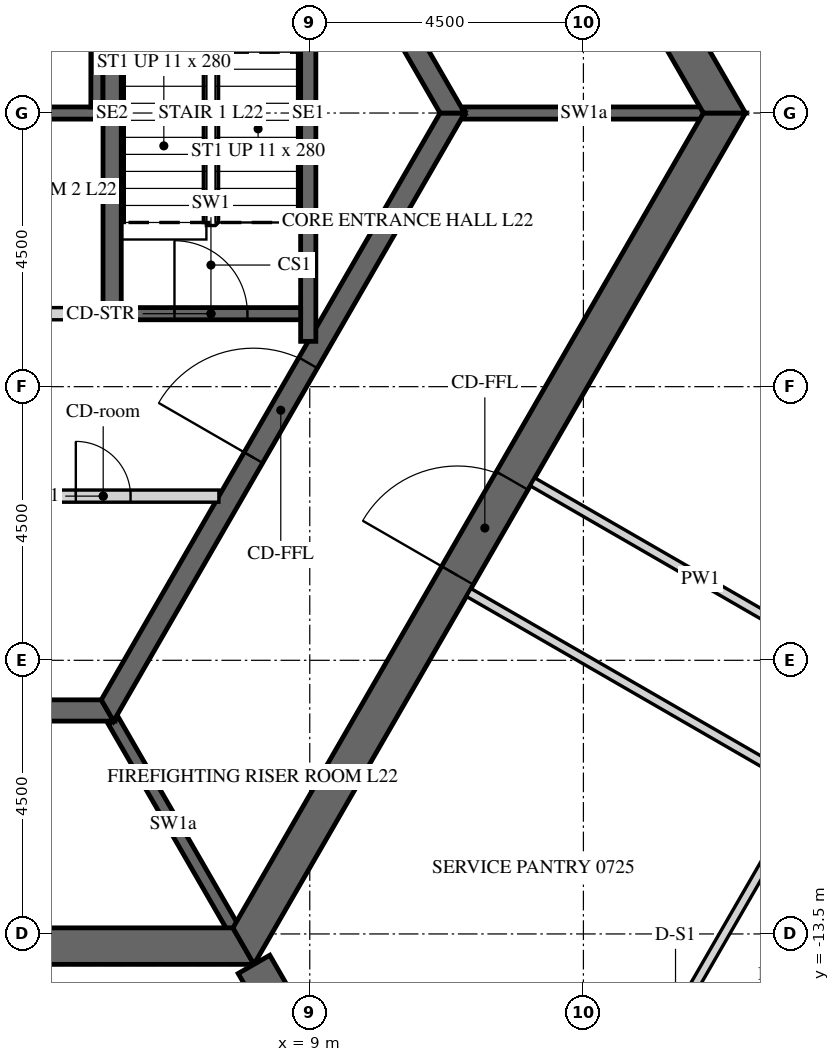
"""IFC4 building model, lengths in metres.
Left out: names, types, materials, properties, quantities, classifications, styles, units other than length and angle.
Written with IfcOpenShell. Run it as: python <this file> out.ifc"""

import sys

from ifc_helpers import new_model, si_unit, direction, frame, frame_2d, origin, place, context, subcontext, project, spatial, polyline, rectangle, outline, extrude, element, fill, save


model = new_model("IFC4")
c1 = context("Model", 3, precision=1e-05, world=origin(), true_north=direction((0.0, 1.0)))
c2 = subcontext(c1, "Body", "Model", "MODEL_VIEW")
j1 = project(units=[si_unit("LENGTHUNIT", "METRE"), si_unit("PLANEANGLEUNIT", "RADIAN")], contexts=[c1])
p1 = place(None, origin())
s1 = spatial("IfcSite", under=j1, at=p1, CompositionType="ELEMENT")
p2 = place(p1, origin())
s2 = spatial("IfcBuilding", under=s1, at=p2, CompositionType="ELEMENT")
p3 = place(p2, frame((0.0, 0.0, 99.9)))
s3 = spatial("IfcBuildingStorey", under=s2, at=p3, CompositionType="ELEMENT", Elevation=99.9)
p4 = place(p3, frame((-7.91, -13.7, -0.15), z_axis=(0.0, 0.0, 1.0), x_axis=(1.0, 0.0, 0.0)))
e1 = element("IfcWall", 1, at=p4, inside=s3, PredefinedType="SHEAR", context=c2, shape_type="SweptSolid", body=[
    extrude(outline(polyline([(-0.173, -0.3), (15.993, -0.3), (15.646, 0.3), (0.173, 0.3), (-0.173, -0.3)])), origin(), (0.0, 0.0, 1.0), 3.9),
])
p5 = place(p4, frame((7.31, 0.0, 0.15)))
e2 = element("IfcOpeningElement", 2, at=p5, cuts=e1, PredefinedType="OPENING", context=c2, shape_type="SweptSolid", body=[
    extrude(rectangle(XDim=1.2, YDim=2.4, at=frame_2d((0.6, 1.2))), frame((0.0, 0.31, 0.0), z_axis=(0.0, -1.0, 0.0), x_axis=(1.0, 0.0, 0.0)), (0.0, 0.0, 1.0), 0.62),
])
p6 = place(p3, frame((7.91, -13.7, -0.15), z_axis=(0.0, 0.0, 1.0), x_axis=(0.499999880136, 0.866025472988, 0.0)))
e3 = element("IfcWall", 3, at=p6, inside=s3, PredefinedType="SHEAR", context=c2, shape_type="SweptSolid", body=[
    extrude(outline(polyline([(-0.173, -0.3), (15.993, -0.3), (15.646, 0.3), (0.173, 0.3), (-0.173, -0.3)])), origin(), (0.0, 0.0, 1.0), 3.9),
])
p7 = place(p6, frame((7.039, 0.0, 0.15)))
e4 = element("IfcOpeningElement", 4, at=p7, cuts=e3, PredefinedType="OPENING", context=c2, shape_type="SweptSolid", body=[
    extrude(rectangle(XDim=1.8, YDim=2.4, at=frame_2d((0.9, 1.2))), frame((0.0, 0.31, 0.0), z_axis=(0.0, -1.0, 0.0), x_axis=(1.0, 0.0, 0.0)), (0.0, 0.0, 1.0), 0.62),
])
p8 = place(p3, frame((15.819, 0.0, -0.15), z_axis=(0.0, 0.0, 1.0), x_axis=(-0.499999880136, 0.866025472988, 0.0)))
e5 = element("IfcWall", 5, at=p8, inside=s3, PredefinedType="SHEAR", context=c2, shape_type="SweptSolid", body=[
    extrude(outline(polyline([(-0.173, -0.3), (15.993, -0.3), (15.646, 0.3), (0.173, 0.3), (-0.173, -0.3)])), origin(), (0.0, 0.0, 1.0), 3.9),
])
p9 = place(p8, frame((6.981, 0.0, 0.15)))
e6 = element("IfcOpeningElement", 6, at=p9, cuts=e5, PredefinedType="OPENING", context=c2, shape_type="SweptSolid", body=[
    extrude(rectangle(XDim=1.8, YDim=2.4, at=frame_2d((0.9, 1.2))), frame((0.0, 0.31, 0.0), z_axis=(0.0, -1.0, 0.0), x_axis=(1.0, 0.0, 0.0)), (0.0, 0.0, 1.0), 0.62),
])
p10 = place(p3, frame((8.083, -14.0, -0.15), z_axis=(0.0, 0.0, 1.0), x_axis=(0.499997680643, -0.866026742862, 0.0)))
e7 = element("IfcWall", 7, at=p10, inside=s3, PredefinedType="SHEAR", context=c2, shape_type="SweptSolid", body=[
    extrude(rectangle(XDim=16.509, YDim=0.6, at=frame_2d((8.254, 0.0))), origin(), (0.0, 0.0, 1.0), 3.9),
])
p11 = place(p10, frame((7.354, 0.0, 0.15)))
e8 = element("IfcOpeningElement", 8, at=p11, cuts=e7, PredefinedType="OPENING", context=c2, shape_type="SweptSolid", body=[
    extrude(rectangle(XDim=1.8, YDim=2.4, at=frame_2d((0.9, 1.2))), frame((0.0, 0.31, 0.0), z_axis=(0.0, -1.0, 0.0), x_axis=(1.0, 0.0, 0.0)), (0.0, 0.0, 1.0), 0.62),
])
p12 = place(p3, frame((-5.673, -9.825, -0.15), z_axis=(0.0, 0.0, 1.0), x_axis=(1.0, 0.0, 0.0)))
e9 = element("IfcWall", 9, at=p12, inside=s3, PredefinedType="SHEAR", context=c2, shape_type="SweptSolid", body=[
    extrude(outline(polyline([(-0.101, -0.175), (11.446, -0.175), (11.244, 0.175), (0.101, 0.175), (-0.101, -0.175)])), origin(), (0.0, 0.0, 1.0), 3.9),
])
p13 = place(p3, frame((5.673, -9.825, -0.15), z_axis=(0.0, 0.0, 1.0), x_axis=(0.499995046907, 0.866028263435, 0.0)))
e10 = element("IfcWall", 10, at=p13, inside=s3, PredefinedType="SHEAR", context=c2, shape_type="SweptSolid", body=[
    extrude(outline(polyline([(-0.101, -0.175), (11.446, -0.175), (11.244, 0.175), (0.101, 0.175), (-0.101, -0.175)])), origin(), (0.0, 0.0, 1.0), 3.9),
])
p14 = place(p13, frame((4.801, 0.0, 0.15)))
e11 = element("IfcOpeningElement", 11, at=p14, cuts=e10, PredefinedType="OPENING", context=c2, shape_type="SweptSolid", body=[
    extrude(rectangle(XDim=1.8, YDim=2.4, at=frame_2d((0.9, 1.2))), frame((0.0, 0.185, 0.0), z_axis=(0.0, -1.0, 0.0), x_axis=(1.0, 0.0, 0.0)), (0.0, 0.0, 1.0), 0.37),
])
p15 = place(p3, frame((11.345, 0.0, -0.15), z_axis=(0.0, 0.0, 1.0), x_axis=(-0.499995046907, 0.866028263435, 0.0)))
e12 = element("IfcWall", 12, at=p15, inside=s3, PredefinedType="SHEAR", context=c2, shape_type="SweptSolid", body=[
    extrude(outline(polyline([(-0.101, -0.175), (11.446, -0.175), (11.244, 0.175), (0.101, 0.175), (-0.101, -0.175)])), origin(), (0.0, 0.0, 1.0), 3.9),
])
p16 = place(p15, frame((4.744, 0.0, 0.15)))
e13 = element("IfcOpeningElement", 13, at=p16, cuts=e12, PredefinedType="OPENING", context=c2, shape_type="SweptSolid", body=[
    extrude(rectangle(XDim=1.8, YDim=2.4, at=frame_2d((0.9, 1.2))), frame((0.0, 0.185, 0.0), z_axis=(0.0, -1.0, 0.0), x_axis=(1.0, 0.0, 0.0)), (0.0, 0.0, 1.0), 0.37),
])
p17 = place(p3, frame((-5.6, 0.0, -0.25), z_axis=(0.0, 0.0, 1.0), x_axis=(1.0, 0.0, 0.0)))
e14 = element("IfcWall", 14, at=p17, inside=s3, PredefinedType="SHEAR", context=c2, shape_type="SweptSolid", body=[
    extrude(rectangle(XDim=11.2, YDim=0.2, at=frame_2d((5.6, 0.0))), origin(), (0.0, 0.0, 1.0), 3.9),
])
p18 = place(p3, frame((5.5, 0.1, -0.25), z_axis=(0.0, 0.0, 1.0), x_axis=(0.0, 1.0, 0.0)))
e15 = element("IfcWall", 15, at=p18, inside=s3, PredefinedType="SHEAR", context=c2, shape_type="SweptSolid", body=[
    extrude(rectangle(XDim=3.1, YDim=0.2, at=frame_2d((1.55, 0.0))), origin(), (0.0, 0.0, 1.0), 3.9),
])
p19 = place(p3, frame((0.1, -3.3, 0.0), z_axis=(0.0, 0.0, 1.0), x_axis=(1.0, 0.0, 0.0)))
e16 = element("IfcWall", 16, at=p19, inside=s3, PredefinedType="PARTITIONING", context=c2, shape_type="SweptSolid", body=[
    extrude(rectangle(XDim=5.5, YDim=0.2, at=frame_2d((2.75, 0.0))), origin(), (0.0, 0.0, 1.0), 3.65),
])
p20 = place(p19, frame((2.3, 0.0, 0.0)))
e17 = element("IfcOpeningElement", 17, at=p20, cuts=e16, PredefinedType="OPENING", context=c2, shape_type="SweptSolid", body=[
    extrude(rectangle(XDim=0.9, YDim=2.1, at=frame_2d((0.45, 1.05))), frame((0.0, 0.11, 0.0), z_axis=(0.0, -1.0, 0.0), x_axis=(1.0, 0.0, 0.0)), (0.0, 0.0, 1.0), 0.22),
])
p21 = place(p3, frame((3.7, -6.3, 0.0), z_axis=(0.0, 0.0, 1.0), x_axis=(1.0, 0.0, 0.0)))
e18 = element("IfcWall", 18, at=p21, inside=s3, PredefinedType="PARTITIONING", context=c2, shape_type="SweptSolid", body=[
    extrude(rectangle(XDim=3.806, YDim=0.2, at=frame_2d((1.903, 0.0))), origin(), (0.0, 0.0, 1.0), 3.65),
])
p22 = place(p21, frame((1.453, 0.0, 0.0)))
e19 = element("IfcOpeningElement", 19, at=p22, cuts=e18, PredefinedType="OPENING", context=c2, shape_type="SweptSolid", body=[
    extrude(rectangle(XDim=0.9, YDim=2.1, at=frame_2d((0.45, 1.05))), frame((0.0, 0.11, 0.0), z_axis=(0.0, -1.0, 0.0), x_axis=(1.0, 0.0, 0.0)), (0.0, 0.0, 1.0), 0.22),
])
p23 = place(p3, frame((11.547, 0.0, -0.15), z_axis=(0.0, 0.0, 1.0), x_axis=(1.0, 0.0, 0.0)))
e20 = element("IfcWall", 20, at=p23, inside=s3, PredefinedType="SHEAR", context=c2, shape_type="SweptSolid", body=[
    extrude(rectangle(XDim=3.926, YDim=0.2, at=frame_2d((1.963, 0.0))), origin(), (0.0, 0.0, 1.0), 3.9),
])
p24 = place(p3, frame((5.773, -10.0, -0.15), z_axis=(0.0, 0.0, 1.0), x_axis=(0.500038251005, -0.86600331843, 0.0)))
e21 = element("IfcWall", 21, at=p24, inside=s3, PredefinedType="SHEAR", context=c2, shape_type="SweptSolid", body=[
    extrude(rectangle(XDim=3.926, YDim=0.2, at=frame_2d((1.963, 0.0))), origin(), (0.0, 0.0, 1.0), 3.9),
])
p25 = place(p3, frame((5.75, -3.4, -0.25), z_axis=(0.0, 0.0, 1.0), x_axis=(0.0, 1.0, 0.0)))
e22 = element("IfcWall", 22, at=p25, inside=s3, PredefinedType="SHEAR", context=c2, shape_type="SweptSolid", body=[
    extrude(rectangle(XDim=6.8, YDim=0.3, at=frame_2d((3.4, 0.0))), origin(), (0.0, 0.0, 1.0), 3.9),
])
p26 = place(p3, frame((8.975, -3.755, -0.25), z_axis=(0.0, 0.0, 1.0), x_axis=(0.0, 1.0, 0.0)))
e23 = element("IfcWall", 23, at=p26, inside=s3, PredefinedType="SHEAR", context=c2, shape_type="SweptSolid", body=[
    extrude(rectangle(XDim=7.51, YDim=0.25, at=frame_2d((3.755, 0.0))), origin(), (0.0, 0.0, 1.0), 3.9),
])
p27 = place(p3, frame((5.9, -3.3, -0.25), z_axis=(0.0, 0.0, 1.0), x_axis=(1.0, 0.0, 0.0)))
e24 = element("IfcWall", 24, at=p27, inside=s3, PredefinedType="SHEAR", context=c2, shape_type="SweptSolid", body=[
    extrude(rectangle(XDim=2.95, YDim=0.2, at=frame_2d((1.475, 0.0))), origin(), (0.0, 0.0, 1.0), 3.9),
])
p28 = place(p27, frame((0.875, 0.0, 0.25)))
e25 = element("IfcOpeningElement", 25, at=p28, cuts=e24, PredefinedType="OPENING", context=c2, shape_type="SweptSolid", body=[
    extrude(rectangle(XDim=1.2, YDim=2.4, at=frame_2d((0.6, 1.2))), frame((0.0, 0.11, 0.0), z_axis=(0.0, -1.0, 0.0), x_axis=(1.0, 0.0, 0.0)), (0.0, 0.0, 1.0), 0.22),
])
p29 = place(p3, frame((14.102, -20.075, 0.0), z_axis=(0.0, 0.0, 1.0), x_axis=(0.499996816197, 0.866027241946, 0.0)))
e26 = element("IfcWall", 26, at=p29, inside=s3, PredefinedType="PARTITIONING", context=c2, shape_type="SweptSolid", body=[
    extrude(rectangle(XDim=24.238, YDim=0.15, at=frame_2d((12.119, 0.0))), origin(), (0.0, 0.0, 1.0), 2.988),
])
p30 = place(p29, frame((4.729, 0.0, 0.0)))
e27 = element("IfcOpeningElement", 27, at=p30, cuts=e26, PredefinedType="OPENING", context=c2, shape_type="SweptSolid", body=[
    extrude(rectangle(XDim=1.0, YDim=2.1, at=frame_2d((0.5, 1.05))), frame((0.0, 0.085, 0.0), z_axis=(0.0, -1.0, 0.0), x_axis=(1.0, 0.0, 0.0)), (0.0, 0.0, 1.0), 0.17),
])
p31 = place(p29, frame((15.946, 0.0, 0.0)))
e28 = element("IfcOpeningElement", 28, at=p31, cuts=e26, PredefinedType="OPENING", context=c2, shape_type="SweptSolid", body=[
    extrude(rectangle(XDim=1.0, YDim=2.1, at=frame_2d((0.5, 1.05))), frame((0.0, 0.085, 0.0), z_axis=(0.0, -1.0, 0.0), x_axis=(1.0, 0.0, 0.0)), (0.0, 0.0, 1.0), 0.17),
])
p32 = place(p3, frame((26.174, 0.985, 0.0), z_axis=(0.0, 0.0, 1.0), x_axis=(-0.559192163771, 0.829038071488, 0.0)))
e29 = element("IfcWall", 29, at=p32, inside=s3, PredefinedType="PARTITIONING", context=c2, shape_type="SweptSolid", body=[
    extrude(rectangle(XDim=22.335, YDim=0.15, at=frame_2d((11.168, 0.0))), origin(), (0.0, 0.0, 1.0), 2.988),
])
p33 = place(p32, frame((3.463, 0.0, 0.0)))
e30 = element("IfcOpeningElement", 30, at=p33, cuts=e29, PredefinedType="OPENING", context=c2, shape_type="SweptSolid", body=[
    extrude(rectangle(XDim=1.0, YDim=2.1, at=frame_2d((0.5, 1.05))), frame((0.0, 0.085, 0.0), z_axis=(0.0, -1.0, 0.0), x_axis=(1.0, 0.0, 0.0)), (0.0, 0.0, 1.0), 0.17),
])
p34 = place(p32, frame((13.309, 0.0, 0.0)))
e31 = element("IfcOpeningElement", 31, at=p34, cuts=e29, PredefinedType="OPENING", context=c2, shape_type="SweptSolid", body=[
    extrude(rectangle(XDim=1.0, YDim=2.1, at=frame_2d((0.5, 1.05))), frame((0.0, 0.085, 0.0), z_axis=(0.0, -1.0, 0.0), x_axis=(1.0, 0.0, 0.0)), (0.0, 0.0, 1.0), 0.17),
])
p35 = place(p3, frame((18.185, -9.253, 0.0), z_axis=(0.0, 0.0, 1.0), x_axis=(-0.866028703517, 0.499994284652, 0.0)))
e32 = element("IfcWall", 32, at=p35, inside=s3, PredefinedType="PARTITIONING", context=c2, shape_type="SweptSolid", body=[
    extrude(rectangle(XDim=6.375, YDim=0.15, at=frame_2d((3.188, 0.0))), origin(), (0.0, 0.0, 1.0), 2.988),
])
p36 = place(p3, frame((11.614, -7.884, 0.0), z_axis=(0.0, 0.0, 1.0), x_axis=(0.866021702275, -0.500006411147, 0.0)))
e33 = element("IfcWall", 33, at=p36, inside=s3, PredefinedType="PARTITIONING", context=c2, shape_type="SweptSolid", body=[
    extrude(rectangle(XDim=6.45, YDim=0.15, at=frame_2d((3.225, 0.0))), origin(), (0.0, 0.0, 1.0), 2.988),
])
p37 = place(p3, frame((17.162, -11.174, 0.0), z_axis=(0.0, 0.0, 1.0), x_axis=(-0.499997214665, -0.866027011893, 0.0)))
e34 = element("IfcWall", 34, at=p37, inside=s3, PredefinedType="PARTITIONING", context=c2, shape_type="SweptSolid", body=[
    extrude(rectangle(XDim=8.589, YDim=0.15, at=frame_2d((4.294, 0.0))), origin(), (0.0, 0.0, 1.0), 2.988),
])
p38 = place(p37, frame((3.844, 0.0, 0.0)))
e35 = element("IfcOpeningElement", 35, at=p38, cuts=e34, PredefinedType="OPENING", context=c2, shape_type="SweptSolid", body=[
    extrude(rectangle(XDim=0.9, YDim=2.1, at=frame_2d((0.45, 1.05))), frame((0.0, 0.085, 0.0), z_axis=(0.0, -1.0, 0.0), x_axis=(1.0, 0.0, 0.0)), (0.0, 0.0, 1.0), 0.17),
])
p39 = place(p7, origin())
e36 = element("IfcDoor", 36, at=p39, inside=s3, OperationType="DOUBLE_DOOR_SINGLE_SWING", PredefinedType="DOOR", context=c2, shape_type="SweptSolid", body=[
    extrude(rectangle(XDim=1.8, YDim=2.4, at=frame_2d((0.9, 1.2))), frame((0.0, 0.025, 0.0), z_axis=(0.0, -1.0, 0.0), x_axis=(1.0, 0.0, 0.0)), (0.0, 0.0, 1.0), 0.05),
])
fill(e4, e36)
p40 = place(p14, origin())
e37 = element("IfcDoor", 37, at=p40, inside=s3, OperationType="DOUBLE_DOOR_SINGLE_SWING", PredefinedType="DOOR", context=c2, shape_type="SweptSolid", body=[
    extrude(rectangle(XDim=1.8, YDim=2.4, at=frame_2d((0.9, 1.2))), frame((0.0, 0.025, 0.0), z_axis=(0.0, -1.0, 0.0), x_axis=(1.0, 0.0, 0.0)), (0.0, 0.0, 1.0), 0.05),
])
fill(e11, e37)
p41 = place(p22, origin())
e38 = element("IfcDoor", 38, at=p41, inside=s3, OperationType="SINGLE_SWING_LEFT", PredefinedType="DOOR", context=c2, shape_type="SweptSolid", body=[
    extrude(rectangle(XDim=0.9, YDim=2.1, at=frame_2d((0.45, 1.05))), frame((0.0, 0.025, 0.0), z_axis=(0.0, -1.0, 0.0), x_axis=(1.0, 0.0, 0.0)), (0.0, 0.0, 1.0), 0.05),
])
fill(e19, e38)
p42 = place(p28, origin())
e39 = element("IfcDoor", 39, at=p42, inside=s3, OperationType="SINGLE_SWING_LEFT", PredefinedType="DOOR", context=c2, shape_type="SweptSolid", body=[
    extrude(rectangle(XDim=1.2, YDim=2.4, at=frame_2d((0.6, 1.2))), frame((0.0, 0.025, 0.0), z_axis=(0.0, -1.0, 0.0), x_axis=(1.0, 0.0, 0.0)), (0.0, 0.0, 1.0), 0.05),
])
fill(e25, e39)
save(model, sys.argv[1])
